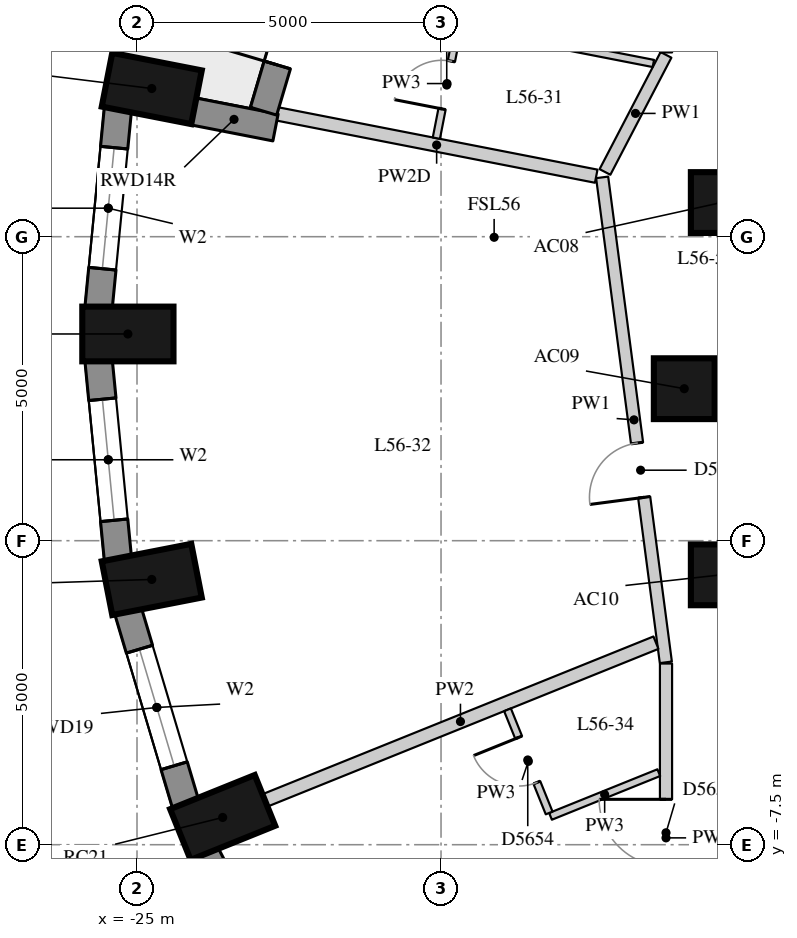
"""IFC4 building model, lengths in metres.
Left out: names, types, materials, properties, quantities, classifications, styles, units other than length and angle.
Written with IfcOpenShell. Run it as: python <this file> out.ifc"""

import sys

from ifc_helpers import new_model, si_unit, direction, frame, frame_2d, origin, origin_2d, place, context, subcontext, project, spatial, rectangle, extrude, element, fill, save


model = new_model("IFC4")
c1 = context("Model", 3, precision=1e-05, world=origin(), true_north=direction((0.0, 1.0)))
c2 = subcontext(c1, "Body", "Model", "MODEL_VIEW")
j1 = project(units=[si_unit("LENGTHUNIT", "METRE"), si_unit("PLANEANGLEUNIT", "RADIAN")], contexts=[c1])
p1 = place(None, origin())
s1 = spatial("IfcSite", under=j1, at=p1, CompositionType="ELEMENT")
p2 = place(p1, origin())
s2 = spatial("IfcBuilding", under=s1, at=p2, CompositionType="ELEMENT")
p3 = place(p2, frame((0.0, 0.0, 199.1)))
s3 = spatial("IfcBuildingStorey", under=s2, at=p3, CompositionType="ELEMENT", Elevation=199.1)
for number, where, z_axis, x_axis in (
    (1, (-24.757, 4.937, 0.0), (0.0, 0.0, 1.0), (-0.981, 0.192, 0.0)),
    (2, (-25.15, 0.9, 0.0), (0.0, 0.0, 1.0), (-1.0, 0.0, 0.0)),
    (3, (-24.757, -3.137, 0.0), (0.0, 0.0, 1.0), (-0.981, -0.192, 0.0)),
    (4, (-23.591, -7.052, 0.0), (0.0, 0.0, 1.0), (-0.927, -0.374, 0.0)),
):
    element("IfcColumn", number, at=place(p3, frame(where, z_axis=z_axis, x_axis=x_axis)), inside=s3, PredefinedType="COLUMN", context=c2, shape_type="SweptSolid", body=[
        extrude(rectangle(XDim=1.5, YDim=0.9, at=origin_2d()), origin(), (0.0, 0.0, 1.0), 3.3),
    ])
for number, where, z_axis, x_axis in (
    (5, (-15.391, 3.062, 0.0), (0.0, 0.0, 1.0), (1.0, 0.0, 0.0)),
    (6, (-16.0, 0.0, 0.0), (0.0, 0.0, 1.0), (1.0, 0.0, 0.0)),
    (7, (-15.391, -3.062, 0.0), (0.0, 0.0, 1.0), (1.0, 0.0, 0.0)),
):
    element("IfcColumn", number, at=place(p3, frame(where, z_axis=z_axis, x_axis=x_axis)), inside=s3, PredefinedType="COLUMN", context=c2, shape_type="SweptSolid", body=[
        extrude(rectangle(XDim=1.0, YDim=1.0, at=origin_2d()), origin(), (0.0, 0.0, 1.0), 3.3),
    ])
p4 = place(p3, frame((-25.313, 4.608, 0.0), z_axis=(0.0, 0.0, 1.0), x_axis=(-0.096824116835, -0.995301507283, 0.0)))
e8 = element("IfcWall", 8, at=p4, inside=s3, PredefinedType="SOLIDWALL", context=c2, shape_type="SweptSolid", body=[
    extrude(rectangle(XDim=3.293, YDim=0.45, at=frame_2d((1.646, 0.0))), origin(), (0.0, 0.0, 1.0), 3.02),
])
p5 = place(p4, frame((0.646, 0.0, 0.4)))
e9 = element("IfcOpeningElement", 9, at=p5, cuts=e8, PredefinedType="OPENING", context=c2, shape_type="SweptSolid", body=[
    extrude(rectangle(XDim=2.0, YDim=1.75, at=frame_2d((1.0, 0.875))), frame((0.0, 0.235, 0.0), z_axis=(0.0, -1.0, 0.0), x_axis=(1.0, 0.0, 0.0)), (0.0, 0.0, 1.0), 0.47),
])
p6 = place(p3, frame((-25.632, 0.47, 0.0), z_axis=(0.0, 0.0, 1.0), x_axis=(0.096816972749, -0.995302202242, 0.0)))
e10 = element("IfcWall", 10, at=p6, inside=s3, PredefinedType="SOLIDWALL", context=c2, shape_type="SweptSolid", body=[
    extrude(rectangle(XDim=3.293, YDim=0.45, at=frame_2d((1.646, 0.0))), origin(), (0.0, 0.0, 1.0), 3.02),
])
p7 = place(p6, frame((0.646, 0.0, 0.4)))
e11 = element("IfcOpeningElement", 11, at=p7, cuts=e10, PredefinedType="OPENING", context=c2, shape_type="SweptSolid", body=[
    extrude(rectangle(XDim=2.0, YDim=1.75, at=frame_2d((1.0, 0.875))), frame((0.0, 0.235, 0.0), z_axis=(0.0, -1.0, 0.0), x_axis=(1.0, 0.0, 0.0)), (0.0, 0.0, 1.0), 0.47),
])
p8 = place(p3, frame((-25.148, -3.652, 0.0), z_axis=(0.0, 0.0, 1.0), x_axis=(0.285444972963, -0.958395099847, 0.0)))
e12 = element("IfcWall", 12, at=p8, inside=s3, PredefinedType="SOLIDWALL", context=c2, shape_type="SweptSolid", body=[
    extrude(rectangle(XDim=3.32, YDim=0.45, at=frame_2d((1.66, 0.0))), origin(), (0.0, 0.0, 1.0), 3.02),
])
p9 = place(p8, frame((0.66, 0.0, 0.4)))
e13 = element("IfcOpeningElement", 13, at=p9, cuts=e12, PredefinedType="OPENING", context=c2, shape_type="SweptSolid", body=[
    extrude(rectangle(XDim=2.0, YDim=1.75, at=frame_2d((1.0, 0.875))), frame((0.0, 0.235, 0.0), z_axis=(0.0, -1.0, 0.0), x_axis=(1.0, 0.0, 0.0)), (0.0, 0.0, 1.0), 0.47),
])
p10 = place(p3, frame((-23.878, -7.632, 0.0), z_axis=(0.0, 0.0, 1.0), x_axis=(0.460232593174, -0.887798378113, 0.0)))
e14 = element("IfcWall", 14, at=p10, inside=s3, PredefinedType="SOLIDWALL", context=c2, shape_type="SweptSolid", body=[
    extrude(rectangle(XDim=3.371, YDim=0.45, at=frame_2d((1.685, 0.0))), origin(), (0.0, 0.0, 1.0), 3.02),
])
p11 = place(p10, frame((0.685, 0.0, 0.4)))
e15 = element("IfcOpeningElement", 15, at=p11, cuts=e14, PredefinedType="OPENING", context=c2, shape_type="SweptSolid", body=[
    extrude(rectangle(XDim=2.0, YDim=1.75, at=frame_2d((1.0, 0.875))), frame((0.0, 0.235, 0.0), z_axis=(0.0, -1.0, 0.0), x_axis=(1.0, 0.0, 0.0)), (0.0, 0.0, 1.0), 0.47),
])
p12 = place(p3, frame((-24.087, 4.563, 0.0), z_axis=(0.0, 0.0, 1.0), x_axis=(0.98143579878, -0.191790961394, 0.0)))
e16 = element("IfcWall", 16, at=p12, inside=s3, PredefinedType="SOLIDWALL", context=c2, shape_type="SweptSolid", body=[
    extrude(rectangle(XDim=1.39, YDim=0.45, at=frame_2d((0.695, 0.0))), origin(), (0.0, 0.0, 1.0), 2.47),
])
p13 = place(p3, frame((-21.854, 8.146, 0.0), z_axis=(0.0, 0.0, 1.0), x_axis=(-0.284757753004, -0.958599510799, 0.0)))
e17 = element("IfcWall", 17, at=p13, inside=s3, PredefinedType="SOLIDWALL", context=c2, shape_type="SweptSolid", body=[
    extrude(rectangle(XDim=3.737, YDim=0.45, at=frame_2d((1.869, 0.0))), origin(), (0.0, 0.0, 1.0), 3.02),
])
p14 = place(p13, frame((0.794, 0.0, 0.4)))
e18 = element("IfcOpeningElement", 18, at=p14, cuts=e17, PredefinedType="OPENING", context=c2, shape_type="SweptSolid", body=[
    extrude(rectangle(XDim=1.0, YDim=1.75, at=frame_2d((0.5, 0.875))), frame((0.0, 0.235, 0.0), z_axis=(0.0, -1.0, 0.0), x_axis=(1.0, 0.0, 0.0)), (0.0, 0.0, 1.0), 0.47),
])
p15 = place(p13, frame((1.944, 0.0, 0.0)))
e19 = element("IfcOpeningElement", 19, at=p15, cuts=e17, PredefinedType="OPENING", context=c2, shape_type="SweptSolid", body=[
    extrude(rectangle(XDim=1.0, YDim=2.15, at=frame_2d((0.5, 1.075))), frame((0.0, 0.235, 0.0), z_axis=(0.0, -1.0, 0.0), x_axis=(1.0, 0.0, 0.0)), (0.0, 0.0, 1.0), 0.47),
])
p16 = place(p3, frame((-16.3, -10.255, 0.0), z_axis=(0.0, 0.0, 1.0), x_axis=(0.0, 1.0, 0.0)))
e20 = element("IfcWall", 20, at=p16, inside=s3, PredefinedType="PARTITIONING", context=c2, shape_type="SweptSolid", body=[
    extrude(rectangle(XDim=5.734, YDim=0.2, at=frame_2d((2.867, 0.0))), origin(), (0.0, 0.0, 1.0), 3.02),
])
p17 = place(p16, frame((2.401, 0.0, 0.0)))
e21 = element("IfcOpeningElement", 21, at=p17, cuts=e20, PredefinedType="OPENING", context=c2, shape_type="SweptSolid", body=[
    extrude(rectangle(XDim=1.1, YDim=2.1, at=frame_2d((0.55, 1.05))), frame((0.0, 0.11, 0.0), z_axis=(0.0, -1.0, 0.0), x_axis=(1.0, 0.0, 0.0)), (0.0, 0.0, 1.0), 0.22),
])
p18 = place(p3, frame((-16.303, -4.501, 0.0), z_axis=(0.0, 0.0, 1.0), x_axis=(-0.130191522351, 0.991488864036, 0.0)))
e22 = element("IfcWall", 22, at=p18, inside=s3, PredefinedType="PARTITIONING", context=c2, shape_type="SweptSolid", body=[
    extrude(rectangle(XDim=8.045, YDim=0.2, at=frame_2d((4.022, 0.0))), origin(), (0.0, 0.0, 1.0), 3.02),
])
p19 = place(p18, frame((2.738, 0.0, 0.0)))
e23 = element("IfcOpeningElement", 23, at=p19, cuts=e22, PredefinedType="OPENING", context=c2, shape_type="SweptSolid", body=[
    extrude(rectangle(XDim=0.9, YDim=2.1, at=frame_2d((0.45, 1.05))), frame((0.0, 0.11, 0.0), z_axis=(0.0, -1.0, 0.0), x_axis=(1.0, 0.0, 0.0)), (0.0, 0.0, 1.0), 0.22),
])
p20 = place(p3, frame((-17.304, 3.565, 0.0), z_axis=(0.0, 0.0, 1.0), x_axis=(0.46212415324, 0.886815238363, 0.0)))
e24 = element("IfcWall", 24, at=p20, inside=s3, PredefinedType="PARTITIONING", context=c2, shape_type="SweptSolid", body=[
    extrude(rectangle(XDim=2.172, YDim=0.2, at=frame_2d((1.086, 0.0))), origin(), (0.0, 0.0, 1.0), 3.02),
])
p21 = place(p3, frame((-16.3, 5.531, 0.0), z_axis=(0.0, 0.0, 1.0), x_axis=(0.0, 1.0, 0.0)))
e25 = element("IfcWall", 25, at=p21, inside=s3, PredefinedType="PARTITIONING", context=c2, shape_type="SweptSolid", body=[
    extrude(rectangle(XDim=2.409, YDim=0.2, at=frame_2d((1.205, 0.0))), origin(), (0.0, 0.0, 1.0), 3.02),
])
p22 = place(p21, frame((0.14, 0.0, 0.0)))
e26 = element("IfcOpeningElement", 26, at=p22, cuts=e25, PredefinedType="OPENING", context=c2, shape_type="SweptSolid", body=[
    extrude(rectangle(XDim=1.1, YDim=2.1, at=frame_2d((0.55, 1.05))), frame((0.0, 0.11, 0.0), z_axis=(0.0, -1.0, 0.0), x_axis=(1.0, 0.0, 0.0)), (0.0, 0.0, 1.0), 0.22),
])
p23 = place(p3, frame((-22.697, 4.521, 0.0), z_axis=(0.0, 0.0, 1.0), x_axis=(0.981448712972, -0.19172486486, 0.0)))
e27 = element("IfcWall", 27, at=p23, inside=s3, PredefinedType="PARTITIONING", context=c2, shape_type="SweptSolid", body=[
    extrude(rectangle(XDim=5.348, YDim=0.22, at=frame_2d((2.674, 0.0))), origin(), (0.0, 0.0, 1.0), 2.47),
])
p24 = place(p3, frame((-22.896, -6.771, 0.0), z_axis=(0.0, 0.0, 1.0), x_axis=(0.927377440276, 0.374127095073, 0.0)))
e28 = element("IfcWall", 28, at=p24, inside=s3, PredefinedType="PARTITIONING", context=c2, shape_type="SweptSolid", body=[
    extrude(rectangle(XDim=6.933, YDim=0.22, at=frame_2d((3.467, 0.0))), origin(), (0.0, 0.0, 1.0), 3.02),
])
p25 = place(p3, frame((-16.508, 5.349, 0.0), z_axis=(0.0, 0.0, 1.0), x_axis=(-0.981441910277, 0.191759684898, 0.0)))
e29 = element("IfcWall", 29, at=p25, inside=s3, PredefinedType="PARTITIONING", context=c2, shape_type="SweptSolid", body=[
    extrude(rectangle(XDim=3.267, YDim=0.12, at=frame_2d((1.633, 0.0))), origin(), (0.0, 0.0, 1.0), 3.02),
])
p26 = place(p3, frame((-16.419, -6.315, 0.0), z_axis=(0.0, 0.0, 1.0), x_axis=(-0.927358946461, -0.374172933841, 0.0)))
e30 = element("IfcWall", 30, at=p26, inside=s3, PredefinedType="PARTITIONING", context=c2, shape_type="SweptSolid", body=[
    extrude(rectangle(XDim=1.92, YDim=0.12, at=frame_2d((0.96, 0.0))), origin(), (0.0, 0.0, 1.0), 3.02),
])
p27 = place(p3, frame((-19.726, 5.917, 0.0), z_axis=(0.0, 0.0, 1.0), x_axis=(-0.191830051998, -0.981428158935, 0.0)))
e31 = element("IfcWall", 31, at=p27, inside=s3, PredefinedType="PARTITIONING", context=c2, shape_type="SweptSolid", body=[
    extrude(rectangle(XDim=1.83, YDim=0.12, at=frame_2d((0.915, 0.0))), origin(), (0.0, 0.0, 1.0), 3.02),
])
p28 = place(p27, frame((0.54, 0.0, 0.0)))
e32 = element("IfcOpeningElement", 32, at=p28, cuts=e31, PredefinedType="OPENING", context=c2, shape_type="SweptSolid", body=[
    extrude(rectangle(XDim=0.8, YDim=2.1, at=frame_2d((0.4, 1.05))), frame((0.0, 0.07, 0.0), z_axis=(0.0, -1.0, 0.0), x_axis=(1.0, 0.0, 0.0)), (0.0, 0.0, 1.0), 0.14),
])
p29 = place(p3, frame((-18.222, -6.978, 0.0), z_axis=(0.0, 0.0, 1.0), x_axis=(-0.374218187905, 0.927340685963, 0.0)))
e33 = element("IfcWall", 33, at=p29, inside=s3, PredefinedType="PARTITIONING", context=c2, shape_type="SweptSolid", body=[
    extrude(rectangle(XDim=1.83, YDim=0.12, at=frame_2d((0.915, 0.0))), origin(), (0.0, 0.0, 1.0), 3.02),
])
p30 = place(p29, frame((0.54, 0.0, 0.0)))
e34 = element("IfcOpeningElement", 34, at=p30, cuts=e33, PredefinedType="OPENING", context=c2, shape_type="SweptSolid", body=[
    extrude(rectangle(XDim=0.8, YDim=2.1, at=frame_2d((0.4, 1.05))), frame((0.0, 0.07, 0.0), z_axis=(0.0, -1.0, 0.0), x_axis=(1.0, 0.0, 0.0)), (0.0, 0.0, 1.0), 0.14),
])
p31 = place(p5, origin())
e35 = element("IfcWindow", 35, at=p31, inside=s3, PartitioningType="SINGLE_PANEL", PredefinedType="WINDOW", context=c2, shape_type="SweptSolid", body=[
    extrude(rectangle(XDim=2.0, YDim=1.75, at=frame_2d((1.0, 0.875))), frame((0.0, 0.035, 0.0), z_axis=(0.0, -1.0, 0.0), x_axis=(1.0, 0.0, 0.0)), (0.0, 0.0, 1.0), 0.06),
])
fill(e9, e35)
p32 = place(p7, origin())
e36 = element("IfcWindow", 36, at=p32, inside=s3, PartitioningType="SINGLE_PANEL", PredefinedType="WINDOW", context=c2, shape_type="SweptSolid", body=[
    extrude(rectangle(XDim=2.0, YDim=1.75, at=frame_2d((1.0, 0.875))), frame((0.0, 0.035, 0.0), z_axis=(0.0, -1.0, 0.0), x_axis=(1.0, 0.0, 0.0)), (0.0, 0.0, 1.0), 0.06),
])
fill(e11, e36)
p33 = place(p9, origin())
e37 = element("IfcWindow", 37, at=p33, inside=s3, PartitioningType="SINGLE_PANEL", PredefinedType="WINDOW", context=c2, shape_type="SweptSolid", body=[
    extrude(rectangle(XDim=2.0, YDim=1.75, at=frame_2d((1.0, 0.875))), frame((0.0, 0.035, 0.0), z_axis=(0.0, -1.0, 0.0), x_axis=(1.0, 0.0, 0.0)), (0.0, 0.0, 1.0), 0.06),
])
fill(e13, e37)
p34 = place(p15, frame((1.0, 0.0, 0.0), z_axis=(0.0, 0.0, 1.0), x_axis=(-1.0, 0.0, 0.0)))
e38 = element("IfcDoor", 38, at=p34, inside=s3, OperationType="SINGLE_SWING_LEFT", PredefinedType="DOOR", context=c2, shape_type="SweptSolid", body=[
    extrude(rectangle(XDim=1.0, YDim=2.15, at=frame_2d((0.5, 1.075))), frame((0.0, 0.075, 0.0), z_axis=(0.0, -1.0, 0.0), x_axis=(1.0, 0.0, 0.0)), (0.0, 0.0, 1.0), 0.05),
])
fill(e19, e38)
p35 = place(p28, origin())
e39 = element("IfcDoor", 39, at=p35, inside=s3, OperationType="SINGLE_SWING_LEFT", PredefinedType="DOOR", context=c2, shape_type="SweptSolid", body=[
    extrude(rectangle(XDim=0.8, YDim=2.1, at=frame_2d((0.4, 1.05))), frame((0.0, 0.025, 0.0), z_axis=(0.0, -1.0, 0.0), x_axis=(1.0, 0.0, 0.0)), (0.0, 0.0, 1.0), 0.05),
])
fill(e32, e39)
p36 = place(p19, origin())
e40 = element("IfcDoor", 40, at=p36, inside=s3, OperationType="SINGLE_SWING_LEFT", PredefinedType="DOOR", context=c2, shape_type="SweptSolid", body=[
    extrude(rectangle(XDim=0.9, YDim=2.1, at=frame_2d((0.45, 1.05))), frame((0.0, 0.025, 0.0), z_axis=(0.0, -1.0, 0.0), x_axis=(1.0, 0.0, 0.0)), (0.0, 0.0, 1.0), 0.05),
])
fill(e23, e40)
p37 = place(p17, origin())
e41 = element("IfcDoor", 41, at=p37, inside=s3, OperationType="SINGLE_SWING_RIGHT", PredefinedType="DOOR", context=c2, shape_type="SweptSolid", body=[
    extrude(rectangle(XDim=1.1, YDim=2.1, at=frame_2d((0.55, 1.05))), frame((0.0, 0.025, 0.0), z_axis=(0.0, -1.0, 0.0), x_axis=(1.0, 0.0, 0.0)), (0.0, 0.0, 1.0), 0.05),
])
fill(e21, e41)
p38 = place(p30, origin())
e42 = element("IfcDoor", 42, at=p38, inside=s3, OperationType="SINGLE_SWING_RIGHT", PredefinedType="DOOR", context=c2, shape_type="SweptSolid", body=[
    extrude(rectangle(XDim=0.8, YDim=2.1, at=frame_2d((0.4, 1.05))), frame((0.0, 0.025, 0.0), z_axis=(0.0, -1.0, 0.0), x_axis=(1.0, 0.0, 0.0)), (0.0, 0.0, 1.0), 0.05),
])
fill(e34, e42)
save(model, sys.argv[1])
